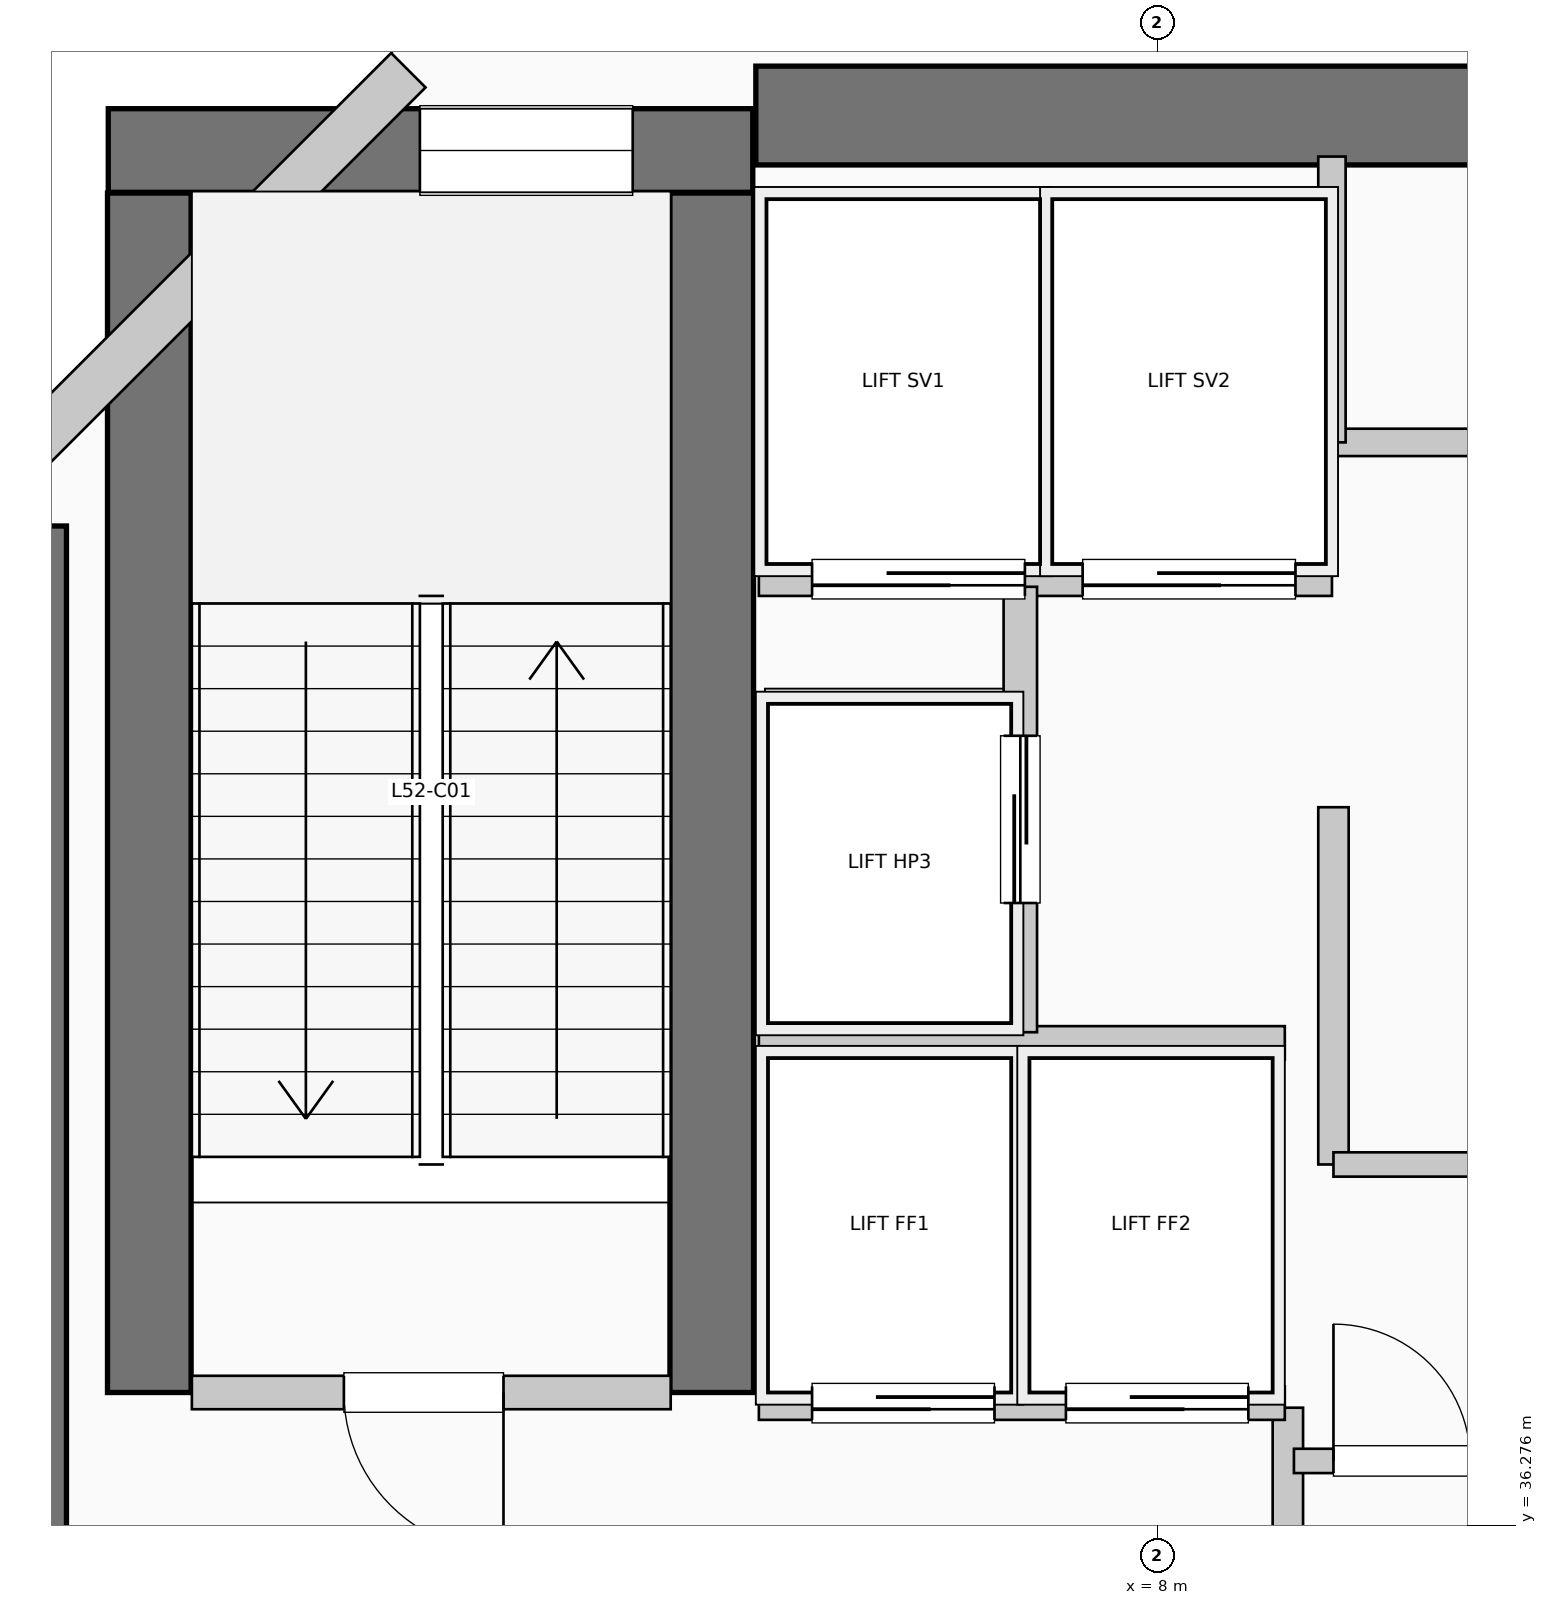
"""IFC4 building model, lengths in metres.
Left out: names, types, materials, properties, quantities, classifications, styles, units other than length and angle.
Written with IfcOpenShell. Run it as: python <this file> out.ifc"""

import sys

from ifc_helpers import new_model, si_unit, direction, frame, frame_2d, origin, place, context, subcontext, project, spatial, rectangle, extrude, element, fill, save


model = new_model("IFC4")
c1 = context("Model", 3, precision=1e-05, world=origin(), true_north=direction((0.0, 1.0)))
c2 = subcontext(c1, "Body", "Model", "MODEL_VIEW")
j1 = project(units=[si_unit("LENGTHUNIT", "METRE"), si_unit("PLANEANGLEUNIT", "RADIAN")], contexts=[c1])
p1 = place(None, origin())
s1 = spatial("IfcSite", under=j1, at=p1, CompositionType="ELEMENT")
p2 = place(p1, origin())
s2 = spatial("IfcBuilding", under=s1, at=p2, CompositionType="ELEMENT")
p3 = place(p2, frame((0.0, 0.0, 215.16)))
s3 = spatial("IfcBuildingStorey", under=s2, at=p3, CompositionType="ELEMENT", Elevation=215.16)
p4 = place(p3, frame((5.36, 45.55, 0.0), z_axis=(0.0, 0.0, 1.0), x_axis=(1.0, 0.0, 0.0)))
e1 = element("IfcWall", 1, at=p4, inside=s3, PredefinedType="SHEAR", context=c2, shape_type="SweptSolid", body=[
    extrude(rectangle(XDim=13.98, YDim=0.65, at=frame_2d((6.99, 0.0))), origin(), (0.0, 0.0, 1.0), 4.62),
])
p5 = place(p3, frame((0.5, 34.95, 0.0), z_axis=(0.0, 0.0, 1.0), x_axis=(0.0, 1.0, 0.0)))
e2 = element("IfcWall", 2, at=p5, inside=s3, PredefinedType="SHEAR", context=c2, shape_type="SweptSolid", body=[
    extrude(rectangle(XDim=7.9, YDim=0.65, at=frame_2d((3.95, 0.0))), origin(), (0.0, 0.0, 1.0), 4.62),
])
for number, where, z_axis, x_axis in (
    (3, (1.37, 37.15, 0.0), (0.0, 0.0, 1.0), (0.0, 1.0, 0.0)),
    (4, (5.07, 37.15, 0.0), (0.0, 0.0, 1.0), (0.0, 1.0, 0.0)),
):
    element("IfcWall", number, at=place(p3, frame(where, z_axis=z_axis, x_axis=x_axis)), inside=s3, PredefinedType="SHEAR", context=c2, shape_type="SweptSolid", body=[
        extrude(rectangle(XDim=7.89, YDim=0.55, at=frame_2d((3.945, 0.0))), origin(), (0.0, 0.0, 1.0), 4.62),
    ])
p6 = place(p3, frame((1.1, 45.32, 0.0), z_axis=(0.0, 0.0, 1.0), x_axis=(1.0, 0.0, 0.0)))
e5 = element("IfcWall", 5, at=p6, inside=s3, PredefinedType="SHEAR", context=c2, shape_type="SweptSolid", body=[
    extrude(rectangle(XDim=4.24, YDim=0.55, at=frame_2d((2.12, 0.0))), origin(), (0.0, 0.0, 1.0), 4.62),
])
p7 = place(p6, frame((2.05, 0.0, 1.05)))
e6 = element("IfcOpeningElement", 6, at=p7, cuts=e5, PredefinedType="OPENING", context=c2, shape_type="SweptSolid", body=[
    extrude(rectangle(XDim=1.4, YDim=1.8, at=frame_2d((0.7, 0.9))), frame((0.0, 0.285, 0.0), z_axis=(0.0, -1.0, 0.0), x_axis=(1.0, 0.0, 0.0)), (0.0, 0.0, 1.0), 0.57),
])
p8 = place(p3, frame((3.074, 45.848, 0.0), z_axis=(0.0, 0.0, 1.0), x_axis=(-0.707106781187, -0.707106781187, 0.0)))
e7 = element("IfcWall", 7, at=p8, inside=s3, PredefinedType="SOLIDWALL", context=c2, shape_type="SweptSolid", body=[
    extrude(rectangle(XDim=4.133, YDim=0.32, at=frame_2d((2.066, 0.0))), origin(), (0.0, 0.0, 1.0), 4.37),
])
p9 = place(p3, frame((1.65, 37.15, 0.0), z_axis=(0.0, 0.0, 1.0), x_axis=(1.0, 0.0, 0.0)))
e8 = element("IfcWall", 8, at=p9, inside=s3, PredefinedType="PARTITIONING", context=c2, shape_type="SweptSolid", body=[
    extrude(rectangle(XDim=3.15, YDim=0.22, at=frame_2d((1.575, 0.0))), origin(), (0.0, 0.0, 1.0), 4.37),
])
p10 = place(p9, frame((2.05, 0.0, 0.0), z_axis=(0.0, 0.0, 1.0), x_axis=(-1.0, 0.0, 0.0)))
e9 = element("IfcOpeningElement", 9, at=p10, cuts=e8, PredefinedType="OPENING", context=c2, shape_type="SweptSolid", body=[
    extrude(rectangle(XDim=1.05, YDim=2.15, at=frame_2d((0.525, 1.075))), frame((0.0, 0.12, 0.0), z_axis=(0.0, -1.0, 0.0), x_axis=(1.0, 0.0, 0.0)), (0.0, 0.0, 1.0), 0.24),
])
p11 = place(p3, frame((8.86, 34.55, 0.0), z_axis=(0.0, 0.0, 1.0), x_axis=(0.0, 1.0, 0.0)))
e10 = element("IfcWall", 10, at=p11, inside=s3, PredefinedType="PARTITIONING", context=c2, shape_type="SweptSolid", body=[
    extrude(rectangle(XDim=2.5, YDim=0.2, at=frame_2d((1.25, 0.0))), origin(), (0.0, 0.0, 1.0), 4.37),
])
p12 = place(p3, frame((5.38, 37.08, 0.0), z_axis=(0.0, 0.0, 1.0), x_axis=(1.0, 0.0, 0.0)))
e11 = element("IfcWall", 11, at=p12, inside=s3, PredefinedType="PARTITIONING", context=c2, shape_type="SweptSolid", body=[
    extrude(rectangle(XDim=3.46, YDim=0.22, at=frame_2d((1.73, 0.0))), origin(), (0.0, 0.0, 1.0), 4.37),
])
p13 = place(p12, frame((1.55, 0.0, 0.0), z_axis=(0.0, 0.0, 1.0), x_axis=(-1.0, 0.0, 0.0)))
e12 = element("IfcOpeningElement", 12, at=p13, cuts=e11, PredefinedType="OPENING", context=c2, shape_type="SweptSolid", body=[
    extrude(rectangle(XDim=1.2, YDim=2.2, at=frame_2d((0.6, 1.1))), frame((0.0, 0.12, 0.0), z_axis=(0.0, -1.0, 0.0), x_axis=(1.0, 0.0, 0.0)), (0.0, 0.0, 1.0), 0.24),
])
p14 = place(p12, frame((3.22, 0.0, 0.0), z_axis=(0.0, 0.0, 1.0), x_axis=(-1.0, 0.0, 0.0)))
e13 = element("IfcOpeningElement", 13, at=p14, cuts=e11, PredefinedType="OPENING", context=c2, shape_type="SweptSolid", body=[
    extrude(rectangle(XDim=1.2, YDim=2.2, at=frame_2d((0.6, 1.1))), frame((0.0, 0.12, 0.0), z_axis=(0.0, -1.0, 0.0), x_axis=(1.0, 0.0, 0.0)), (0.0, 0.0, 1.0), 0.24),
])
p15 = place(p3, frame((5.38, 39.45, 0.0), z_axis=(0.0, 0.0, 1.0), x_axis=(1.0, 0.0, 0.0)))
e14 = element("IfcWall", 14, at=p15, inside=s3, PredefinedType="PARTITIONING", context=c2, shape_type="SweptSolid", body=[
    extrude(rectangle(XDim=3.46, YDim=0.22, at=frame_2d((1.73, 0.0))), origin(), (0.0, 0.0, 1.0), 4.37),
])
p16 = place(p3, frame((5.38, 42.5, 0.0), z_axis=(0.0, 0.0, 1.0), x_axis=(1.0, 0.0, 0.0)))
e15 = element("IfcWall", 15, at=p16, inside=s3, PredefinedType="PARTITIONING", context=c2, shape_type="SweptSolid", body=[
    extrude(rectangle(XDim=3.77, YDim=0.22, at=frame_2d((1.885, 0.0))), origin(), (0.0, 0.0, 1.0), 4.37),
])
p17 = place(p16, frame((1.75, 0.0, 0.0), z_axis=(0.0, 0.0, 1.0), x_axis=(-1.0, 0.0, 0.0)))
e16 = element("IfcOpeningElement", 16, at=p17, cuts=e15, PredefinedType="OPENING", context=c2, shape_type="SweptSolid", body=[
    extrude(rectangle(XDim=1.4, YDim=2.2, at=frame_2d((0.7, 1.1))), frame((0.0, 0.12, 0.0), z_axis=(0.0, -1.0, 0.0), x_axis=(1.0, 0.0, 0.0)), (0.0, 0.0, 1.0), 0.24),
])
p18 = place(p16, frame((3.53, 0.0, 0.0), z_axis=(0.0, 0.0, 1.0), x_axis=(-1.0, 0.0, 0.0)))
e17 = element("IfcOpeningElement", 17, at=p18, cuts=e15, PredefinedType="OPENING", context=c2, shape_type="SweptSolid", body=[
    extrude(rectangle(XDim=1.4, YDim=2.2, at=frame_2d((0.7, 1.1))), frame((0.0, 0.12, 0.0), z_axis=(0.0, -1.0, 0.0), x_axis=(1.0, 0.0, 0.0)), (0.0, 0.0, 1.0), 0.24),
])
p19 = place(p3, frame((7.1, 39.52, 0.0), z_axis=(0.0, 0.0, 1.0), x_axis=(0.0, 1.0, 0.0)))
e18 = element("IfcWall", 18, at=p19, inside=s3, PredefinedType="PARTITIONING", context=c2, shape_type="SweptSolid", body=[
    extrude(rectangle(XDim=2.93, YDim=0.22, at=frame_2d((1.465, 0.0))), origin(), (0.0, 0.0, 1.0), 4.37),
])
p20 = place(p19, frame((0.85, 0.0, 0.0)))
e19 = element("IfcOpeningElement", 19, at=p20, cuts=e18, PredefinedType="OPENING", context=c2, shape_type="SweptSolid", body=[
    extrude(rectangle(XDim=1.1, YDim=2.2, at=frame_2d((0.55, 1.1))), frame((0.0, 0.12, 0.0), z_axis=(0.0, -1.0, 0.0), x_axis=(1.0, 0.0, 0.0)), (0.0, 0.0, 1.0), 0.24),
])
p21 = place(p3, frame((9.16, 38.65, 0.0), z_axis=(0.0, 0.0, 1.0), x_axis=(0.0, 1.0, 0.0)))
e20 = element("IfcWall", 20, at=p21, inside=s3, PredefinedType="PARTITIONING", context=c2, shape_type="SweptSolid", body=[
    extrude(rectangle(XDim=2.35, YDim=0.2, at=frame_2d((1.175, 0.0))), origin(), (0.0, 0.0, 1.0), 4.37),
])
p22 = place(p3, frame((8.9, 36.7, 0.0), z_axis=(0.0, 0.0, 1.0), x_axis=(1.0, 0.0, 0.0)))
e21 = element("IfcWall", 21, at=p22, inside=s3, PredefinedType="PARTITIONING", context=c2, shape_type="SweptSolid", body=[
    extrude(rectangle(XDim=3.25, YDim=0.16, at=frame_2d((1.625, 0.0))), origin(), (0.0, 0.0, 1.0), 4.37),
])
p23 = place(p22, frame((0.26, 0.0, 0.0)))
e22 = element("IfcOpeningElement", 22, at=p23, cuts=e21, PredefinedType="OPENING", context=c2, shape_type="SweptSolid", body=[
    extrude(rectangle(XDim=0.9, YDim=2.15, at=frame_2d((0.45, 1.075))), frame((0.0, 0.09, 0.0), z_axis=(0.0, -1.0, 0.0), x_axis=(1.0, 0.0, 0.0)), (0.0, 0.0, 1.0), 0.18),
])
p24 = place(p22, frame((1.68, 0.0, 0.0)))
e23 = element("IfcOpeningElement", 23, at=p24, cuts=e21, PredefinedType="OPENING", context=c2, shape_type="SweptSolid", body=[
    extrude(rectangle(XDim=0.9, YDim=2.15, at=frame_2d((0.45, 1.075))), frame((0.0, 0.09, 0.0), z_axis=(0.0, -1.0, 0.0), x_axis=(1.0, 0.0, 0.0)), (0.0, 0.0, 1.0), 0.18),
])
p25 = place(p3, frame((9.16, 38.65, 0.0), z_axis=(0.0, 0.0, 1.0), x_axis=(1.0, 0.0, 0.0)))
e24 = element("IfcWall", 24, at=p25, inside=s3, PredefinedType="PARTITIONING", context=c2, shape_type="SweptSolid", body=[
    extrude(rectangle(XDim=3.42, YDim=0.16, at=frame_2d((1.71, 0.0))), origin(), (0.0, 0.0, 1.0), 4.37),
])
p26 = place(p25, frame((2.15, 0.0, 0.0), z_axis=(0.0, 0.0, 1.0), x_axis=(-1.0, 0.0, 0.0)))
e25 = element("IfcOpeningElement", 25, at=p26, cuts=e24, PredefinedType="OPENING", context=c2, shape_type="SweptSolid", body=[
    extrude(rectangle(XDim=0.95, YDim=2.15, at=frame_2d((0.475, 1.075))), frame((0.0, 0.09, 0.0), z_axis=(0.0, -1.0, 0.0), x_axis=(1.0, 0.0, 0.0)), (0.0, 0.0, 1.0), 0.18),
])
p27 = place(p3, frame((9.15, 43.4, 0.0), z_axis=(0.0, 0.0, 1.0), x_axis=(1.0, 0.0, 0.0)))
e26 = element("IfcWall", 26, at=p27, inside=s3, PredefinedType="PLUMBINGWALL", context=c2, shape_type="SweptSolid", body=[
    extrude(rectangle(XDim=9.33, YDim=0.18, at=frame_2d((4.665, 0.0))), origin(), (0.0, 0.0, 1.0), 4.37),
])
p28 = place(p27, frame((1.88, 0.0, 0.0)))
e27 = element("IfcOpeningElement", 27, at=p28, cuts=e26, PredefinedType="OPENING", context=c2, shape_type="SweptSolid", body=[
    extrude(rectangle(XDim=0.92, YDim=2.1, at=frame_2d((0.46, 1.05))), frame((0.0, 0.1, 0.0), z_axis=(0.0, -1.0, 0.0), x_axis=(1.0, 0.0, 0.0)), (0.0, 0.0, 1.0), 0.2),
])
p29 = place(p27, frame((6.515, 0.0, 0.0)))
e28 = element("IfcOpeningElement", 28, at=p29, cuts=e26, PredefinedType="OPENING", context=c2, shape_type="SweptSolid", body=[
    extrude(rectangle(XDim=0.92, YDim=2.1, at=frame_2d((0.46, 1.05))), frame((0.0, 0.1, 0.0), z_axis=(0.0, -1.0, 0.0), x_axis=(1.0, 0.0, 0.0)), (0.0, 0.0, 1.0), 0.2),
])
p30 = place(p3, frame((9.15, 43.4, 0.0), z_axis=(0.0, 0.0, 1.0), x_axis=(0.0, 1.0, 0.0)))
e29 = element("IfcWall", 29, at=p30, inside=s3, PredefinedType="PLUMBINGWALL", context=c2, shape_type="SweptSolid", body=[
    extrude(rectangle(XDim=1.88, YDim=0.18, at=frame_2d((0.94, 0.0))), origin(), (0.0, 0.0, 1.0), 4.37),
])
p31 = place(p7, origin())
e30 = element("IfcWindow", 30, at=p31, inside=s3, PartitioningType="SINGLE_PANEL", PredefinedType="WINDOW", context=c2, shape_type="SweptSolid", body=[
    extrude(rectangle(XDim=1.4, YDim=1.8, at=frame_2d((0.7, 0.9))), frame((0.0, 0.03, 0.0), z_axis=(0.0, -1.0, 0.0), x_axis=(1.0, 0.0, 0.0)), (0.0, 0.0, 1.0), 0.06),
])
fill(e6, e30)
p32 = place(p10, origin())
e31 = element("IfcDoor", 31, at=p32, inside=s3, OperationType="SINGLE_SWING_RIGHT", PredefinedType="DOOR", context=c2, shape_type="SweptSolid", body=[
    extrude(rectangle(XDim=1.05, YDim=2.15, at=frame_2d((0.525, 1.075))), frame((0.0, 0.025, 0.0), z_axis=(0.0, -1.0, 0.0), x_axis=(1.0, 0.0, 0.0)), (0.0, 0.0, 1.0), 0.05),
])
fill(e9, e31)
p33 = place(p13, origin())
e32 = element("IfcDoor", 32, at=p33, inside=s3, OperationType="SLIDING_TO_RIGHT", PredefinedType="DOOR", context=c2, shape_type="SweptSolid", body=[
    extrude(rectangle(XDim=1.2, YDim=2.2, at=frame_2d((0.6, 1.1))), frame((0.0, 0.025, 0.0), z_axis=(0.0, -1.0, 0.0), x_axis=(1.0, 0.0, 0.0)), (0.0, 0.0, 1.0), 0.05),
])
fill(e12, e32)
p34 = place(p14, origin())
e33 = element("IfcDoor", 33, at=p34, inside=s3, OperationType="SLIDING_TO_RIGHT", PredefinedType="DOOR", context=c2, shape_type="SweptSolid", body=[
    extrude(rectangle(XDim=1.2, YDim=2.2, at=frame_2d((0.6, 1.1))), frame((0.0, 0.025, 0.0), z_axis=(0.0, -1.0, 0.0), x_axis=(1.0, 0.0, 0.0)), (0.0, 0.0, 1.0), 0.05),
])
fill(e13, e33)
p35 = place(p17, origin())
e34 = element("IfcDoor", 34, at=p35, inside=s3, OperationType="SLIDING_TO_LEFT", PredefinedType="DOOR", context=c2, shape_type="SweptSolid", body=[
    extrude(rectangle(XDim=1.4, YDim=2.2, at=frame_2d((0.7, 1.1))), frame((0.0, 0.025, 0.0), z_axis=(0.0, -1.0, 0.0), x_axis=(1.0, 0.0, 0.0)), (0.0, 0.0, 1.0), 0.05),
])
fill(e16, e34)
p36 = place(p18, origin())
e35 = element("IfcDoor", 35, at=p36, inside=s3, OperationType="SLIDING_TO_LEFT", PredefinedType="DOOR", context=c2, shape_type="SweptSolid", body=[
    extrude(rectangle(XDim=1.4, YDim=2.2, at=frame_2d((0.7, 1.1))), frame((0.0, 0.025, 0.0), z_axis=(0.0, -1.0, 0.0), x_axis=(1.0, 0.0, 0.0)), (0.0, 0.0, 1.0), 0.05),
])
fill(e17, e35)
p37 = place(p20, origin())
e36 = element("IfcDoor", 36, at=p37, inside=s3, OperationType="SLIDING_TO_LEFT", PredefinedType="DOOR", context=c2, shape_type="SweptSolid", body=[
    extrude(rectangle(XDim=1.1, YDim=2.2, at=frame_2d((0.55, 1.1))), frame((0.0, 0.025, 0.0), z_axis=(0.0, -1.0, 0.0), x_axis=(1.0, 0.0, 0.0)), (0.0, 0.0, 1.0), 0.05),
])
fill(e19, e36)
p38 = place(p23, origin())
e37 = element("IfcDoor", 37, at=p38, inside=s3, OperationType="SINGLE_SWING_LEFT", PredefinedType="DOOR", context=c2, shape_type="SweptSolid", body=[
    extrude(rectangle(XDim=0.9, YDim=2.15, at=frame_2d((0.45, 1.075))), frame((0.0, 0.025, 0.0), z_axis=(0.0, -1.0, 0.0), x_axis=(1.0, 0.0, 0.0)), (0.0, 0.0, 1.0), 0.05),
])
fill(e22, e37)
save(model, sys.argv[1])
